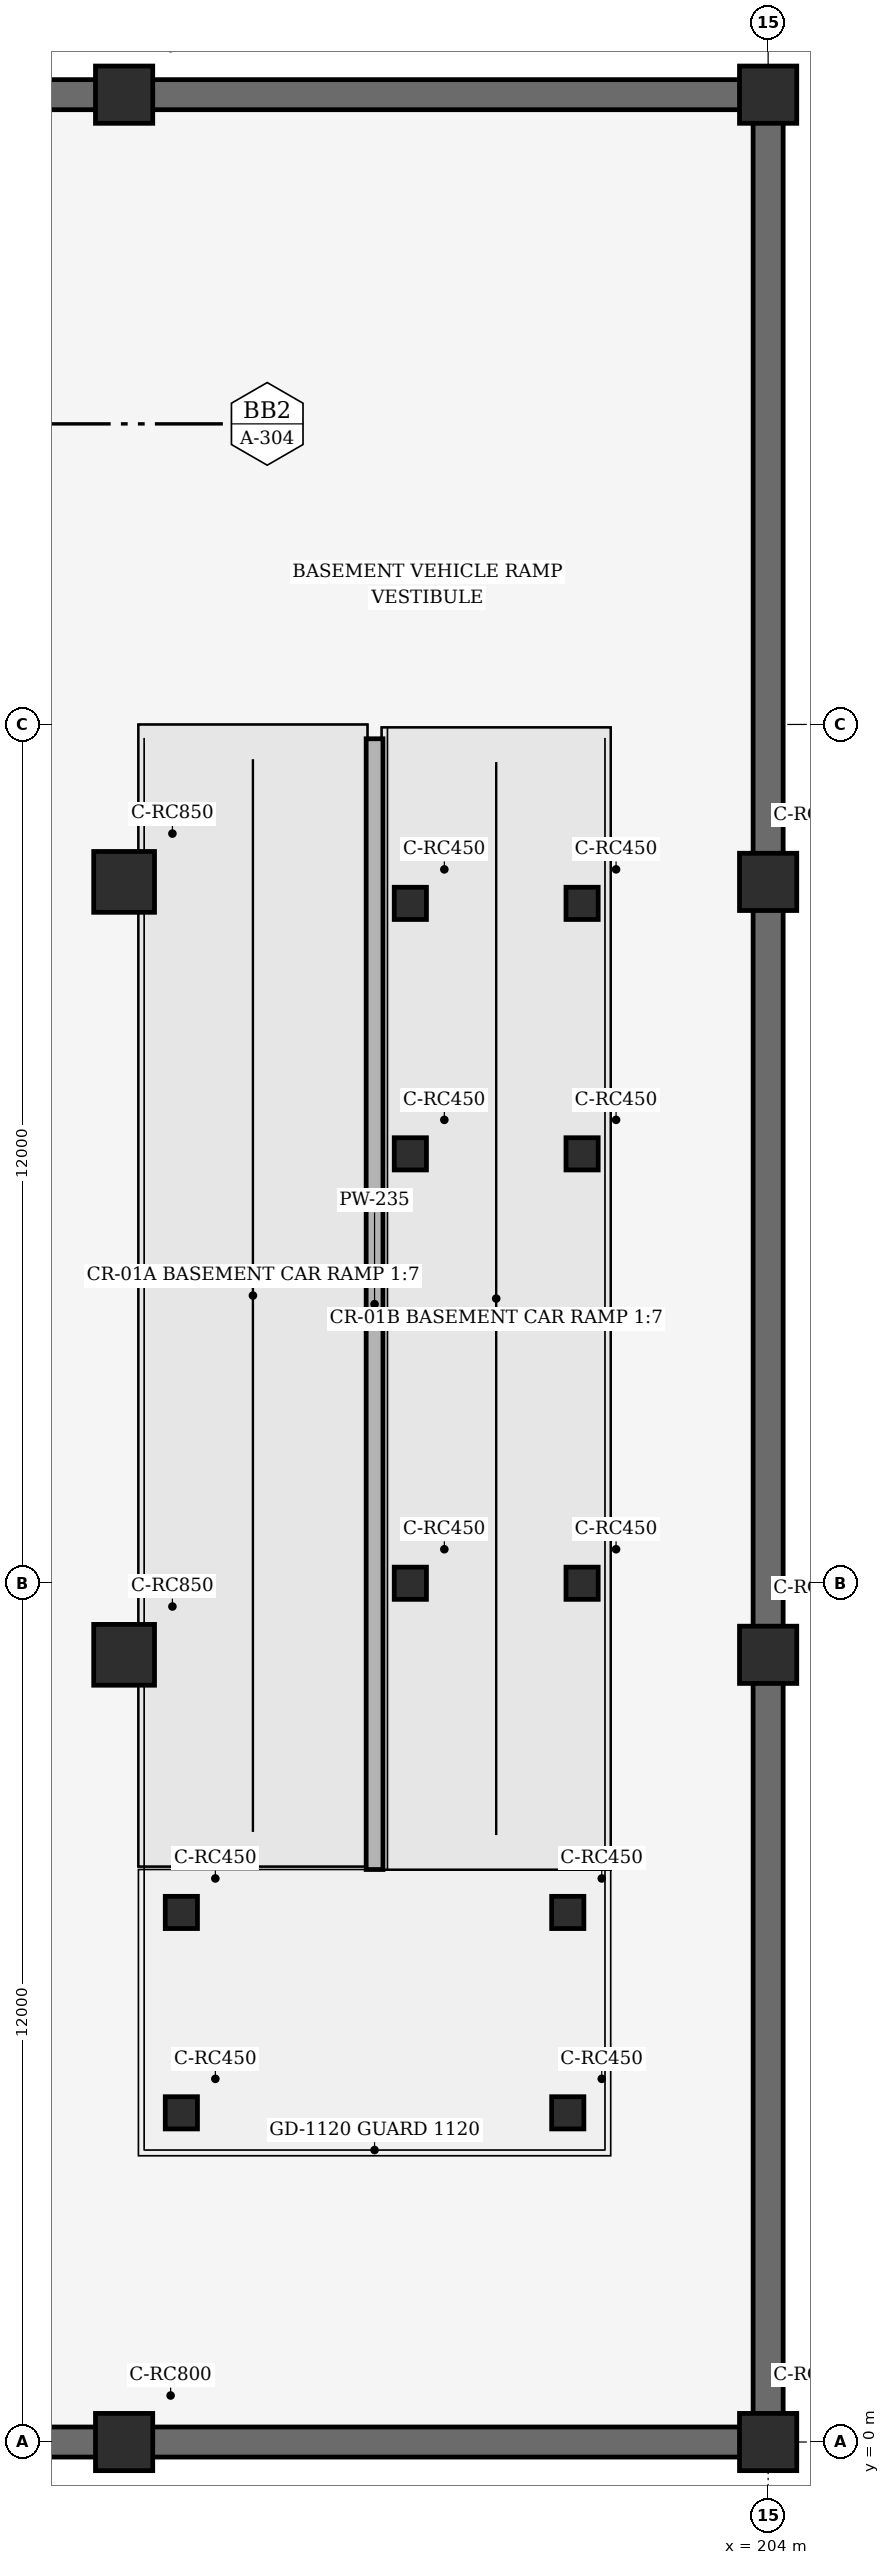
"""IFC4 building model, lengths in metres.
Left out: names, types, materials, properties, quantities, classifications, styles, units other than length and angle.
Written with IfcOpenShell. Run it as: python <this file> out.ifc"""

import sys

from ifc_helpers import new_model, si_unit, direction, frame, frame_2d, origin, origin_2d, place, context, subcontext, project, spatial, rectangle, extrude, element, save


model = new_model("IFC4")
c1 = context("Model", 3, precision=1e-05, world=origin(), true_north=direction((0.0, 1.0)))
c2 = subcontext(c1, "Body", "Model", "MODEL_VIEW")
j1 = project(units=[si_unit("LENGTHUNIT", "METRE"), si_unit("PLANEANGLEUNIT", "RADIAN")], contexts=[c1])
p1 = place(None, origin())
s1 = spatial("IfcSite", under=j1, at=p1, CompositionType="ELEMENT")
p2 = place(p1, origin())
s2 = spatial("IfcBuilding", under=s1, at=p2, CompositionType="ELEMENT")
p3 = place(p2, frame((0.0, 0.0, -4.8)))
s3 = spatial("IfcBuildingStorey", under=s2, at=p3, CompositionType="ELEMENT", Elevation=-4.8)
p4 = place(p3, frame((195.0, 0.0, -0.45), z_axis=(0.0, 0.0, 1.0), x_axis=(1.0, 0.0, 0.0)))
e1 = element("IfcColumn", 1, at=p4, inside=s3, PredefinedType="COLUMN", context=c2, shape_type="SweptSolid", body=[
    extrude(rectangle(XDim=0.8, YDim=0.8, at=origin_2d()), origin(), (0.0, 0.0, 1.0), 5.25),
])
for number, where, z_axis, x_axis in (
    (2, (195.0, 11.0, -0.45), (0.0, 0.0, 1.0), (1.0, 0.0, 0.0)),
    (3, (195.0, 21.8, -0.45), (0.0, 0.0, 1.0), (1.0, 0.0, 0.0)),
):
    element("IfcColumn", number, at=place(p3, frame(where, z_axis=z_axis, x_axis=x_axis)), inside=s3, PredefinedType="COLUMN", context=c2, shape_type="SweptSolid", body=[
        extrude(rectangle(XDim=0.85, YDim=0.85, at=origin_2d()), origin(), (0.0, 0.0, 1.0), 5.25),
    ])
for number, where, z_axis, x_axis in (
    (4, (195.0, 32.8, -0.45), (0.0, 0.0, 1.0), (1.0, 0.0, 0.0)),
    (5, (204.0, 0.0, -0.45), (0.0, 0.0, 1.0), (1.0, 0.0, 0.0)),
    (6, (204.0, 11.0, -0.45), (0.0, 0.0, 1.0), (1.0, 0.0, 0.0)),
    (7, (204.0, 21.8, -0.45), (0.0, 0.0, 1.0), (1.0, 0.0, 0.0)),
    (8, (204.0, 32.8, -0.45), (0.0, 0.0, 1.0), (1.0, 0.0, 0.0)),
):
    element("IfcColumn", number, at=place(p3, frame(where, z_axis=z_axis, x_axis=x_axis)), inside=s3, PredefinedType="COLUMN", context=c2, shape_type="SweptSolid", body=[
        extrude(rectangle(XDim=0.8, YDim=0.8, at=origin_2d()), origin(), (0.0, 0.0, 1.0), 5.25),
    ])
for number, where, z_axis, x_axis in (
    (9, (195.8, 4.6, 0.0), (0.0, 0.0, 1.0), (1.0, 0.0, 0.0)),
    (10, (195.8, 7.4, 0.0), (0.0, 0.0, 1.0), (1.0, 0.0, 0.0)),
    (11, (201.2, 4.6, 0.0), (0.0, 0.0, 1.0), (1.0, 0.0, 0.0)),
    (12, (201.2, 7.4, 0.0), (0.0, 0.0, 1.0), (1.0, 0.0, 0.0)),
):
    element("IfcColumn", number, at=place(p3, frame(where, z_axis=z_axis, x_axis=x_axis)), inside=s3, PredefinedType="COLUMN", context=c2, shape_type="SweptSolid", body=[
        extrude(rectangle(XDim=0.45, YDim=0.45, at=origin_2d()), origin(), (0.0, 0.0, 1.0), 2.072),
    ])
for number, where, z_axis, x_axis in (
    (13, (199.0, 12.0, 0.0), (0.0, 0.0, 1.0), (1.0, 0.0, 0.0)),
    (14, (201.4, 12.0, 0.0), (0.0, 0.0, 1.0), (1.0, 0.0, 0.0)),
):
    element("IfcColumn", number, at=place(p3, frame(where, z_axis=z_axis, x_axis=x_axis)), inside=s3, PredefinedType="COLUMN", context=c2, shape_type="SweptSolid", body=[
        extrude(rectangle(XDim=0.45, YDim=0.45, at=origin_2d()), origin(), (0.0, 0.0, 1.0), 2.702),
    ])
for number, where, z_axis, x_axis in (
    (15, (199.0, 18.0, 0.0), (0.0, 0.0, 1.0), (1.0, 0.0, 0.0)),
    (16, (201.4, 18.0, 0.0), (0.0, 0.0, 1.0), (1.0, 0.0, 0.0)),
):
    element("IfcColumn", number, at=place(p3, frame(where, z_axis=z_axis, x_axis=x_axis)), inside=s3, PredefinedType="COLUMN", context=c2, shape_type="SweptSolid", body=[
        extrude(rectangle(XDim=0.45, YDim=0.45, at=origin_2d()), origin(), (0.0, 0.0, 1.0), 3.604),
    ])
for number, where, z_axis, x_axis in (
    (17, (199.0, 21.5, 0.0), (0.0, 0.0, 1.0), (1.0, 0.0, 0.0)),
    (18, (201.4, 21.5, 0.0), (0.0, 0.0, 1.0), (1.0, 0.0, 0.0)),
):
    element("IfcColumn", number, at=place(p3, frame(where, z_axis=z_axis, x_axis=x_axis)), inside=s3, PredefinedType="COLUMN", context=c2, shape_type="SweptSolid", body=[
        extrude(rectangle(XDim=0.45, YDim=0.45, at=origin_2d()), origin(), (0.0, 0.0, 1.0), 4.13),
    ])
for number, where, z_axis, x_axis in (
    (19, (186.0, 0.0, 0.0), (0.0, 0.0, 1.0), (1.0, 0.0, 0.0)),
    (20, (195.0, 32.8, 0.0), (0.0, 0.0, 1.0), (-1.0, 0.0, 0.0)),
    (21, (195.0, 0.0, 0.0), (0.0, 0.0, 1.0), (1.0, 0.0, 0.0)),
    (22, (204.0, 32.8, 0.0), (0.0, 0.0, 1.0), (-1.0, 0.0, 0.0)),
):
    element("IfcWall", number, at=place(p3, frame(where, z_axis=z_axis, x_axis=x_axis)), inside=s3, PredefinedType="STANDARD", context=c2, shape_type="SweptSolid", body=[
        extrude(rectangle(XDim=9.0, YDim=0.42, at=frame_2d((4.5, 0.0))), origin(), (0.0, 0.0, 1.0), 4.54),
    ])
p5 = place(p3, frame((204.0, 0.0, 0.0), z_axis=(0.0, 0.0, 1.0), x_axis=(0.0, 1.0, 0.0)))
e23 = element("IfcWall", 23, at=p5, inside=s3, PredefinedType="STANDARD", context=c2, shape_type="SweptSolid", body=[
    extrude(rectangle(XDim=11.0, YDim=0.42, at=frame_2d((5.5, 0.0))), origin(), (0.0, 0.0, 1.0), 4.54),
])
p6 = place(p3, frame((204.0, 11.0, 0.0), z_axis=(0.0, 0.0, 1.0), x_axis=(0.0, 1.0, 0.0)))
e24 = element("IfcWall", 24, at=p6, inside=s3, PredefinedType="STANDARD", context=c2, shape_type="SweptSolid", body=[
    extrude(rectangle(XDim=10.8, YDim=0.42, at=frame_2d((5.4, 0.0))), origin(), (0.0, 0.0, 1.0), 4.54),
])
p7 = place(p3, frame((204.0, 21.8, 0.0), z_axis=(0.0, 0.0, 1.0), x_axis=(0.0, 1.0, 0.0)))
e25 = element("IfcWall", 25, at=p7, inside=s3, PredefinedType="STANDARD", context=c2, shape_type="SweptSolid", body=[
    extrude(rectangle(XDim=11.0, YDim=0.42, at=frame_2d((5.5, 0.0))), origin(), (0.0, 0.0, 1.0), 4.54),
])
p8 = place(p3, frame((198.5, 8.0, 0.0), z_axis=(0.0, 0.0, 1.0), x_axis=(0.0, 1.0, 0.0)))
e26 = element("IfcWall", 26, at=p8, inside=s3, PredefinedType="PARAPET", context=c2, shape_type="SweptSolid", body=[
    extrude(rectangle(XDim=15.8, YDim=0.235, at=frame_2d((7.9, 0.0))), origin(), (0.0, 0.0, 1.0), 5.95),
])
save(model, sys.argv[1])
